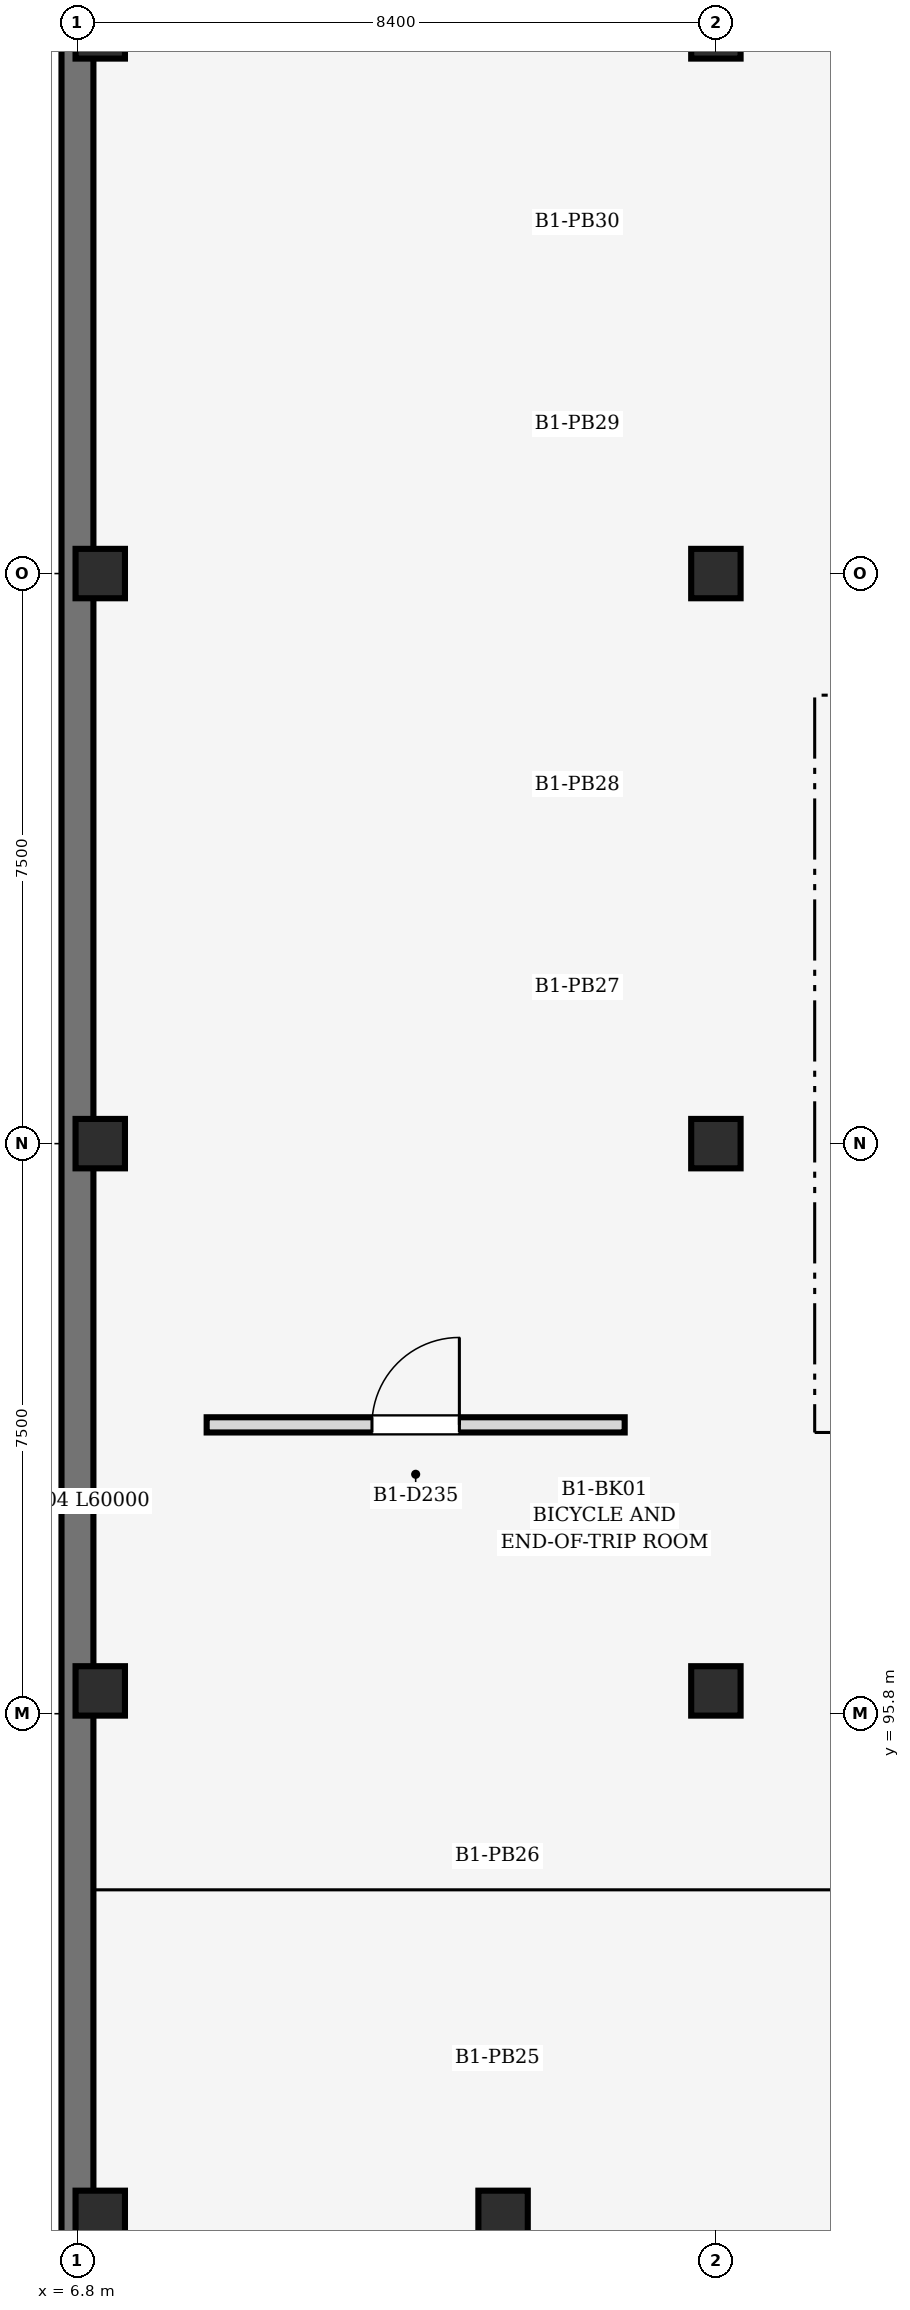
"""IFC4 building model, lengths in metres.
Left out: names, types, materials, properties, quantities, classifications, styles, units other than length and angle.
Written with IfcOpenShell. Run it as: python <this file> out.ifc"""

import sys

from ifc_helpers import new_model, si_unit, direction, frame, frame_2d, origin, origin_2d, place, context, subcontext, project, spatial, rectangle, extrude, element, fill, save


model = new_model("IFC4")
c1 = context("Model", 3, precision=1e-05, world=origin(), true_north=direction((0.0, 1.0)))
c2 = subcontext(c1, "Body", "Model", "MODEL_VIEW")
j1 = project(units=[si_unit("LENGTHUNIT", "METRE"), si_unit("PLANEANGLEUNIT", "RADIAN")], contexts=[c1])
p1 = place(None, origin())
s1 = spatial("IfcSite", under=j1, at=p1, CompositionType="ELEMENT")
p2 = place(p1, origin())
s2 = spatial("IfcBuilding", under=s1, at=p2, CompositionType="ELEMENT")
p3 = place(p2, frame((0.0, 0.0, -4.8)))
s3 = spatial("IfcBuildingStorey", under=s2, at=p3, CompositionType="ELEMENT", Elevation=-4.8)
for number, where, z_axis, x_axis in (
    (1, (7.1, 96.1, 0.0), (0.0, 0.0, 1.0), (1.0, 0.0, 0.0)),
    (2, (7.1, 103.3, 0.0), (0.0, 0.0, 1.0), (1.0, 0.0, 0.0)),
    (3, (7.1, 110.8, 0.0), (0.0, 0.0, 1.0), (1.0, 0.0, 0.0)),
    (4, (7.1, 117.9, 0.0), (0.0, 0.0, 1.0), (1.0, 0.0, 0.0)),
    (5, (15.2, 96.1, 0.0), (0.0, 0.0, 1.0), (1.0, 0.0, 0.0)),
    (6, (15.2, 103.3, 0.0), (0.0, 0.0, 1.0), (1.0, 0.0, 0.0)),
    (7, (15.2, 110.8, 0.0), (0.0, 0.0, 1.0), (1.0, 0.0, 0.0)),
    (8, (15.2, 117.9, 0.0), (0.0, 0.0, 1.0), (1.0, 0.0, 0.0)),
    (9, (7.1, 89.2, 0.0), (0.0, 0.0, 1.0), (1.0, 0.0, 0.0)),
    (10, (12.4, 89.2, 0.0), (0.0, 0.0, 1.0), (1.0, 0.0, 0.0)),
):
    element("IfcColumn", number, at=place(p3, frame(where, z_axis=z_axis, x_axis=x_axis)), inside=s3, PredefinedType="COLUMN", context=c2, shape_type="SweptSolid", body=[
        extrude(rectangle(XDim=0.65, YDim=0.65, at=origin_2d()), origin(), (0.0, 0.0, 1.0), 4.8),
    ])
p4 = place(p3, frame((6.8, 118.2, 0.0), z_axis=(0.0, 0.0, 1.0), x_axis=(0.0, -1.0, 0.0)))
e11 = element("IfcWall", 11, at=p4, inside=s3, PredefinedType="SOLIDWALL", context=c2, shape_type="SweptSolid", body=[
    extrude(rectangle(XDim=60.0, YDim=0.42, at=frame_2d((30.0, 0.0))), origin(), (0.0, 0.0, 1.0), 4.5),
])
p5 = place(p3, frame((8.5, 99.6, 0.0), z_axis=(0.0, 0.0, 1.0), x_axis=(1.0, 0.0, 0.0)))
e12 = element("IfcWall", 12, at=p5, inside=s3, PredefinedType="PARTITIONING", context=c2, shape_type="SweptSolid", body=[
    extrude(rectangle(XDim=5.5, YDim=0.2, at=frame_2d((2.75, 0.0))), origin(), (0.0, 0.0, 1.0), 4.505),
])
p6 = place(p5, frame((2.175, 0.0, 0.0)))
e13 = element("IfcOpeningElement", 13, at=p6, cuts=e12, PredefinedType="OPENING", context=c2, shape_type="SweptSolid", body=[
    extrude(rectangle(XDim=1.15, YDim=2.25, at=frame_2d((0.575, 1.125))), frame((0.0, 0.112, 0.0), z_axis=(0.0, -1.0, 0.0), x_axis=(1.0, 0.0, 0.0)), (0.0, 0.0, 1.0), 0.224),
])
p7 = place(p6, origin())
e14 = element("IfcDoor", 14, at=p7, inside=s3, OperationType="SINGLE_SWING_RIGHT", PredefinedType="DOOR", context=c2, shape_type="SweptSolid", body=[
    extrude(rectangle(XDim=1.15, YDim=2.25, at=frame_2d((0.575, 1.125))), frame((0.0, 0.025, 0.0), z_axis=(0.0, -1.0, 0.0), x_axis=(1.0, 0.0, 0.0)), (0.0, 0.0, 1.0), 0.05),
])
fill(e13, e14)
save(model, sys.argv[1])
